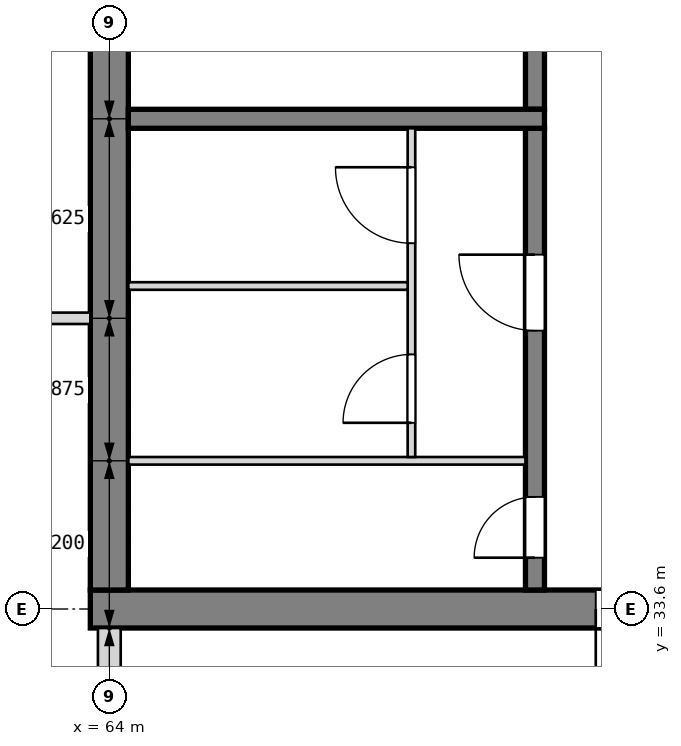
"""IFC4 building model, lengths in metres.
Left out: names, types, materials, properties, quantities, classifications, styles, units other than length and angle.
Written with IfcOpenShell. Run it as: python <this file> out.ifc"""

import sys

from ifc_helpers import new_model, si_unit, direction, frame, frame_2d, origin, place, context, subcontext, project, spatial, rectangle, extrude, element, fill, save


model = new_model("IFC4")
c1 = context("Model", 3, precision=1e-05, world=origin(), true_north=direction((0.0, 1.0)))
c2 = subcontext(c1, "Body", "Model", "MODEL_VIEW")
j1 = project(units=[si_unit("LENGTHUNIT", "METRE"), si_unit("PLANEANGLEUNIT", "RADIAN")], contexts=[c1])
p1 = place(None, origin())
s1 = spatial("IfcSite", under=j1, at=p1, CompositionType="ELEMENT")
p2 = place(p1, origin())
s2 = spatial("IfcBuilding", under=s1, at=p2, CompositionType="ELEMENT")
p3 = place(p2, frame((0.0, 0.0, 8.4)))
s3 = spatial("IfcBuildingStorey", under=s2, at=p3, CompositionType="ELEMENT", Elevation=8.4)
p4 = place(p3, frame((63.75, 33.6, 0.0), z_axis=(0.0, 0.0, 1.0), x_axis=(1.0, 0.0, 0.0)))
e1 = element("IfcWall", 1, at=p4, inside=s3, PredefinedType="SHEAR", context=c2, shape_type="SweptSolid", body=[
    extrude(rectangle(XDim=13.3, YDim=0.5, at=frame_2d((6.65, 0.0))), origin(), (0.0, 0.0, 1.0), 4.5),
])
p5 = place(p4, frame((11.05, 0.0, 1.0)))
e2 = element("IfcOpeningElement", 2, at=p5, cuts=e1, PredefinedType="OPENING", context=c2, shape_type="SweptSolid", body=[
    extrude(rectangle(XDim=0.4, YDim=2.0, at=frame_2d((0.2, 1.0))), frame((0.0, 0.26, 0.0), z_axis=(0.0, -1.0, 0.0), x_axis=(1.0, 0.0, 0.0)), (0.0, 0.0, 1.0), 0.52),
])
p6 = place(p4, frame((6.65, 0.0, 0.0)))
e3 = element("IfcOpeningElement", 3, at=p6, cuts=e1, PredefinedType="OPENING", context=c2, shape_type="SweptSolid", body=[
    extrude(rectangle(XDim=2.0, YDim=2.1, at=frame_2d((1.0, 1.05))), frame((0.0, 0.26, 0.0), z_axis=(0.0, -1.0, 0.0), x_axis=(1.0, 0.0, 0.0)), (0.0, 0.0, 1.0), 0.52),
])
p7 = place(p3, frame((64.0, 33.85, 0.0), z_axis=(0.0, 0.0, 1.0), x_axis=(0.0, 1.0, 0.0)))
e4 = element("IfcWall", 4, at=p7, inside=s3, PredefinedType="SHEAR", context=c2, shape_type="SweptSolid", body=[
    extrude(rectangle(XDim=18.7, YDim=0.5, at=frame_2d((9.35, 0.0))), origin(), (0.0, 0.0, 1.0), 4.5),
])
p8 = place(p7, frame((8.35, 0.0, 0.0)))
e5 = element("IfcOpeningElement", 5, at=p8, cuts=e4, PredefinedType="OPENING", context=c2, shape_type="SweptSolid", body=[
    extrude(rectangle(XDim=2.0, YDim=2.1, at=frame_2d((1.0, 1.05))), frame((0.0, 0.26, 0.0), z_axis=(0.0, -1.0, 0.0), x_axis=(1.0, 0.0, 0.0)), (0.0, 0.0, 1.0), 0.52),
])
p9 = place(p3, frame((64.0, 31.0, 0.0), z_axis=(0.0, 0.0, 1.0), x_axis=(0.0, 1.0, 0.0)))
e6 = element("IfcWall", 6, at=p9, inside=s3, PredefinedType="SOLIDWALL", context=c2, shape_type="SweptSolid", body=[
    extrude(rectangle(XDim=2.35, YDim=0.3, at=frame_2d((1.175, 0.0))), origin(), (0.0, 0.0, 1.0), 3.48),
])
p10 = place(p3, frame((69.6, 33.85, 0.0), z_axis=(0.0, 0.0, 1.0), x_axis=(0.0, 1.0, 0.0)))
e7 = element("IfcWall", 7, at=p10, inside=s3, PredefinedType="SOLIDWALL", context=c2, shape_type="SweptSolid", body=[
    extrude(rectangle(XDim=6.075, YDim=0.25, at=frame_2d((3.038, 0.0))), origin(), (0.0, 0.0, 1.0), 4.2),
])
p11 = place(p10, frame((0.425, 0.0, 0.0)))
e8 = element("IfcOpeningElement", 8, at=p11, cuts=e7, PredefinedType="OPENING", context=c2, shape_type="SweptSolid", body=[
    extrude(rectangle(XDim=0.8, YDim=2.1, at=frame_2d((0.4, 1.05))), frame((0.0, 0.135, 0.0), z_axis=(0.0, -1.0, 0.0), x_axis=(1.0, 0.0, 0.0)), (0.0, 0.0, 1.0), 0.27),
])
p12 = place(p10, frame((3.413, 0.0, 0.0)))
e9 = element("IfcOpeningElement", 9, at=p12, cuts=e7, PredefinedType="OPENING", context=c2, shape_type="SweptSolid", body=[
    extrude(rectangle(XDim=1.0, YDim=2.1, at=frame_2d((0.5, 1.05))), frame((0.0, 0.135, 0.0), z_axis=(0.0, -1.0, 0.0), x_axis=(1.0, 0.0, 0.0)), (0.0, 0.0, 1.0), 0.27),
])
p13 = place(p3, frame((69.6, 40.175, 0.0), z_axis=(0.0, 0.0, 1.0), x_axis=(0.0, 1.0, 0.0)))
e10 = element("IfcWall", 10, at=p13, inside=s3, PredefinedType="SOLIDWALL", context=c2, shape_type="SweptSolid", body=[
    extrude(rectangle(XDim=6.05, YDim=0.25, at=frame_2d((3.025, 0.0))), origin(), (0.0, 0.0, 1.0), 4.2),
])
p14 = place(p13, frame((2.025, 0.0, 0.0)))
e11 = element("IfcOpeningElement", 11, at=p14, cuts=e10, PredefinedType="OPENING", context=c2, shape_type="SweptSolid", body=[
    extrude(rectangle(XDim=2.0, YDim=2.1, at=frame_2d((1.0, 1.05))), frame((0.0, 0.135, 0.0), z_axis=(0.0, -1.0, 0.0), x_axis=(1.0, 0.0, 0.0)), (0.0, 0.0, 1.0), 0.27),
])
p15 = place(p3, frame((69.725, 40.05, 0.0), z_axis=(0.0, 0.0, 1.0), x_axis=(-1.0, 0.0, 0.0)))
e12 = element("IfcWall", 12, at=p15, inside=s3, PredefinedType="SOLIDWALL", context=c2, shape_type="SweptSolid", body=[
    extrude(rectangle(XDim=5.475, YDim=0.25, at=frame_2d((2.738, 0.0))), origin(), (0.0, 0.0, 1.0), 4.2),
])
p16 = place(p3, frame((69.475, 35.55, 0.0), z_axis=(0.0, 0.0, 1.0), x_axis=(-1.0, 0.0, 0.0)))
e13 = element("IfcWall", 13, at=p16, inside=s3, PredefinedType="PARTITIONING", context=c2, shape_type="SweptSolid", body=[
    extrude(rectangle(XDim=5.225, YDim=0.1, at=frame_2d((2.613, 0.0))), origin(), (0.0, 0.0, 1.0), 4.2),
])
p17 = place(p3, frame((67.975, 35.6, 0.0), z_axis=(0.0, 0.0, 1.0), x_axis=(0.0, 1.0, 0.0)))
e14 = element("IfcWall", 14, at=p17, inside=s3, PredefinedType="PARTITIONING", context=c2, shape_type="SweptSolid", body=[
    extrude(rectangle(XDim=4.325, YDim=0.1, at=frame_2d((2.163, 0.0))), origin(), (0.0, 0.0, 1.0), 4.2),
])
p18 = place(p17, frame((0.45, 0.0, 0.0)))
e15 = element("IfcOpeningElement", 15, at=p18, cuts=e14, PredefinedType="OPENING", context=c2, shape_type="SweptSolid", body=[
    extrude(rectangle(XDim=0.9, YDim=2.1, at=frame_2d((0.45, 1.05))), frame((0.0, 0.06, 0.0), z_axis=(0.0, -1.0, 0.0), x_axis=(1.0, 0.0, 0.0)), (0.0, 0.0, 1.0), 0.12),
])
p19 = place(p17, frame((2.812, 0.0, 0.0)))
e16 = element("IfcOpeningElement", 16, at=p19, cuts=e14, PredefinedType="OPENING", context=c2, shape_type="SweptSolid", body=[
    extrude(rectangle(XDim=1.0, YDim=2.1, at=frame_2d((0.5, 1.05))), frame((0.0, 0.06, 0.0), z_axis=(0.0, -1.0, 0.0), x_axis=(1.0, 0.0, 0.0)), (0.0, 0.0, 1.0), 0.12),
])
p20 = place(p3, frame((67.925, 37.85, 0.0), z_axis=(0.0, 0.0, 1.0), x_axis=(-1.0, 0.0, 0.0)))
e17 = element("IfcWall", 17, at=p20, inside=s3, PredefinedType="PARTITIONING", context=c2, shape_type="SweptSolid", body=[
    extrude(rectangle(XDim=3.675, YDim=0.1, at=frame_2d((1.837, 0.0))), origin(), (0.0, 0.0, 1.0), 4.2),
])
p21 = place(p3, frame((57.78, 37.425, 0.0), z_axis=(0.0, 0.0, 1.0), x_axis=(1.0, 0.0, 0.0)))
e18 = element("IfcWall", 18, at=p21, inside=s3, PredefinedType="PARTITIONING", context=c2, shape_type="SweptSolid", body=[
    extrude(rectangle(XDim=5.97, YDim=0.15, at=frame_2d((2.985, 0.0))), origin(), (0.0, 0.0, 1.0), 4.28),
])
p22 = place(p21, frame((2.52, 0.0, 0.0)))
e19 = element("IfcOpeningElement", 19, at=p22, cuts=e18, PredefinedType="OPENING", context=c2, shape_type="SweptSolid", body=[
    extrude(rectangle(XDim=1.0, YDim=2.1, at=frame_2d((0.5, 1.05))), frame((0.0, 0.085, 0.0), z_axis=(0.0, -1.0, 0.0), x_axis=(1.0, 0.0, 0.0)), (0.0, 0.0, 1.0), 0.17),
])
p23 = place(p11, origin())
e20 = element("IfcDoor", 20, at=p23, inside=s3, OperationType="SINGLE_SWING_LEFT", PredefinedType="DOOR", context=c2, shape_type="SweptSolid", body=[
    extrude(rectangle(XDim=0.8, YDim=2.1, at=frame_2d((0.4, 1.05))), frame((0.0, 0.025, 0.0), z_axis=(0.0, -1.0, 0.0), x_axis=(1.0, 0.0, 0.0)), (0.0, 0.0, 1.0), 0.05),
])
fill(e8, e20)
p24 = place(p12, origin())
e21 = element("IfcDoor", 21, at=p24, inside=s3, OperationType="SINGLE_SWING_RIGHT", PredefinedType="DOOR", context=c2, shape_type="SweptSolid", body=[
    extrude(rectangle(XDim=1.0, YDim=2.1, at=frame_2d((0.5, 1.05))), frame((0.0, 0.025, 0.0), z_axis=(0.0, -1.0, 0.0), x_axis=(1.0, 0.0, 0.0)), (0.0, 0.0, 1.0), 0.05),
])
fill(e9, e21)
p25 = place(p18, origin())
e22 = element("IfcDoor", 22, at=p25, inside=s3, OperationType="SINGLE_SWING_LEFT", PredefinedType="DOOR", context=c2, shape_type="SweptSolid", body=[
    extrude(rectangle(XDim=0.9, YDim=2.1, at=frame_2d((0.45, 1.05))), frame((0.0, 0.025, 0.0), z_axis=(0.0, -1.0, 0.0), x_axis=(1.0, 0.0, 0.0)), (0.0, 0.0, 1.0), 0.05),
])
fill(e15, e22)
p26 = place(p19, origin())
e23 = element("IfcDoor", 23, at=p26, inside=s3, OperationType="SINGLE_SWING_RIGHT", PredefinedType="DOOR", context=c2, shape_type="SweptSolid", body=[
    extrude(rectangle(XDim=1.0, YDim=2.1, at=frame_2d((0.5, 1.05))), frame((0.0, 0.025, 0.0), z_axis=(0.0, -1.0, 0.0), x_axis=(1.0, 0.0, 0.0)), (0.0, 0.0, 1.0), 0.05),
])
fill(e16, e23)
p27 = place(p6, frame((2.0, 0.0, 0.0), z_axis=(0.0, 0.0, 1.0), x_axis=(-1.0, 0.0, 0.0)))
e24 = element("IfcDoor", 24, at=p27, inside=s3, OperationType="DOUBLE_DOOR_SINGLE_SWING", PredefinedType="DOOR", context=c2, shape_type="SweptSolid", body=[
    extrude(rectangle(XDim=2.0, YDim=2.1, at=frame_2d((1.0, 1.05))), frame((0.0, 0.025, 0.0), z_axis=(0.0, -1.0, 0.0), x_axis=(1.0, 0.0, 0.0)), (0.0, 0.0, 1.0), 0.05),
])
fill(e3, e24)
save(model, sys.argv[1])
